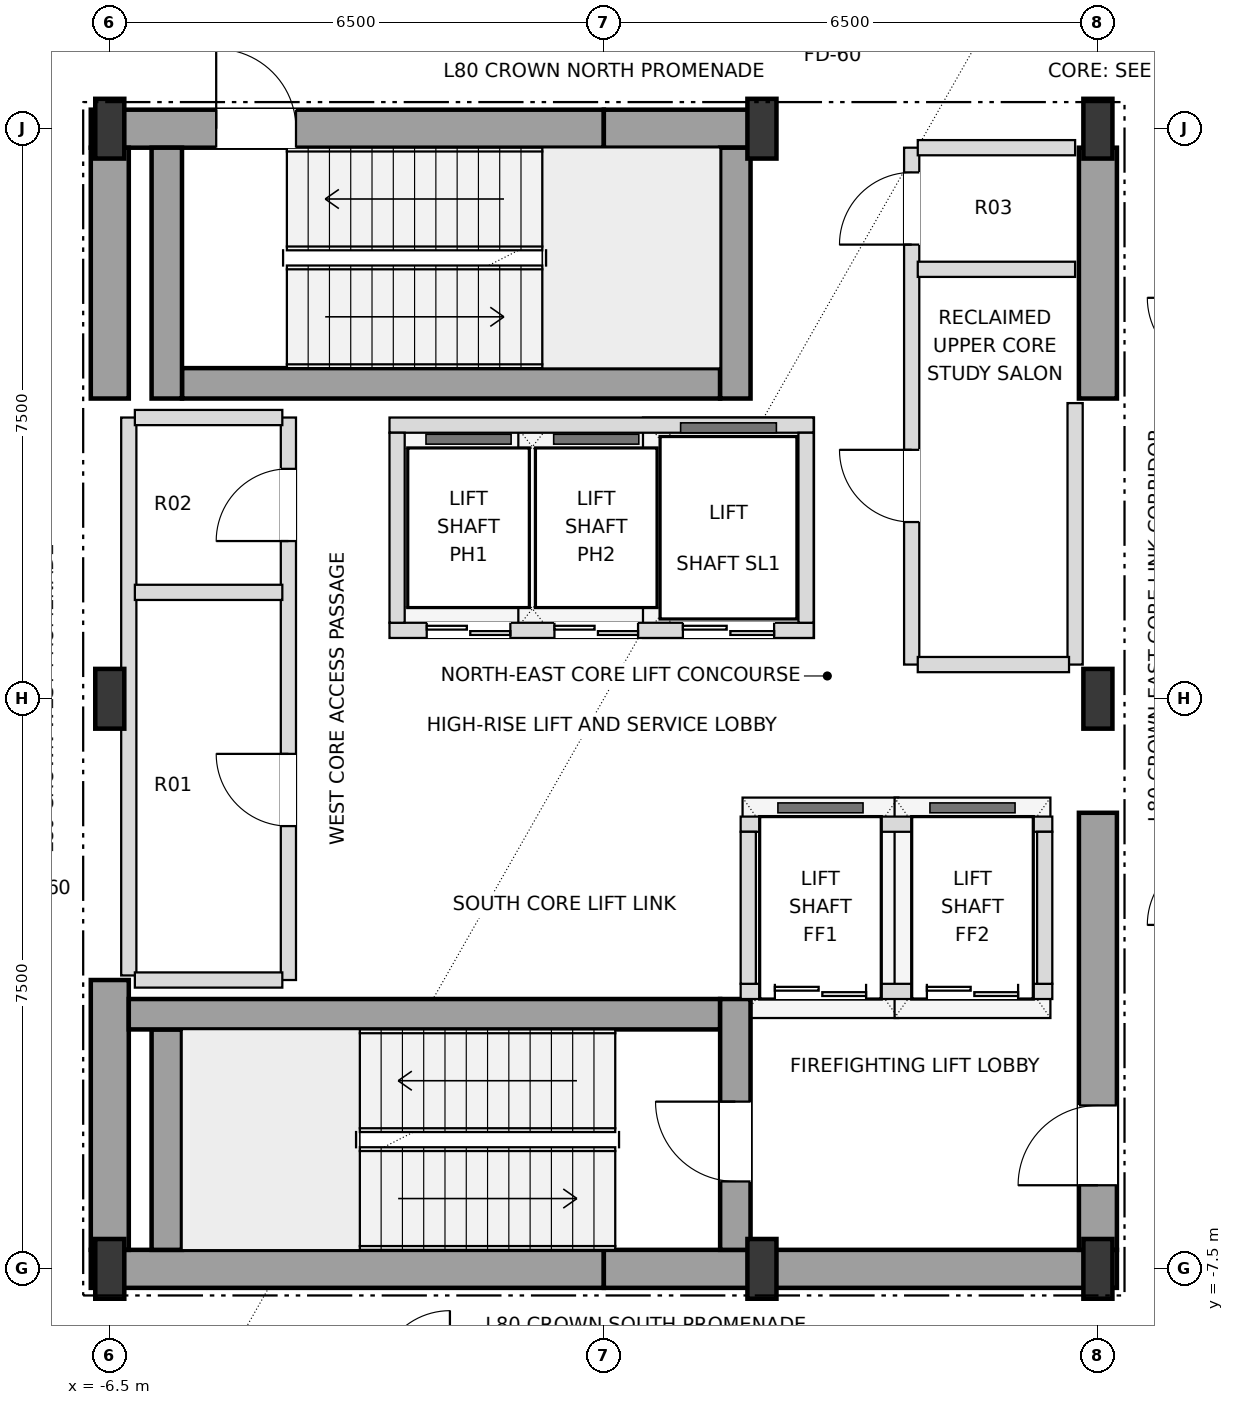
"""IFC4 building model, lengths in metres.
Left out: names, types, materials, properties, quantities, classifications, styles, units other than length and angle.
Written with IfcOpenShell. Run it as: python <this file> out.ifc"""

import sys

from ifc_helpers import new_model, si_unit, direction, frame, frame_2d, origin, origin_2d, place, context, subcontext, project, spatial, rectangle, i_section, extrude, element, fill, save


model = new_model("IFC4")
c1 = context("Model", 3, precision=1e-05, world=origin(), true_north=direction((0.0, 1.0)))
c2 = subcontext(c1, "Body", "Model", "MODEL_VIEW")
j1 = project(units=[si_unit("LENGTHUNIT", "METRE"), si_unit("PLANEANGLEUNIT", "RADIAN")], contexts=[c1])
p1 = place(None, origin())
s1 = spatial("IfcSite", under=j1, at=p1, CompositionType="ELEMENT")
p2 = place(p1, origin())
s2 = spatial("IfcBuilding", under=s1, at=p2, CompositionType="ELEMENT")
p3 = place(p2, frame((0.0, 0.0, 305.1)))
s3 = spatial("IfcBuildingStorey", under=s2, at=p3, CompositionType="ELEMENT", Elevation=305.1)
for number, where, z_axis, x_axis in (
    (1, (-6.5, -7.5, 0.0), (0.0, 0.0, 1.0), (1.0, 0.0, 0.0)),
    (2, (2.08, -7.5, 0.0), (0.0, 0.0, 1.0), (1.0, 0.0, 0.0)),
    (3, (6.5, -7.5, 0.0), (0.0, 0.0, 1.0), (1.0, 0.0, 0.0)),
    (4, (-6.5, 0.0, 0.0), (0.0, 0.0, 1.0), (1.0, 0.0, 0.0)),
    (5, (6.5, 0.0, 0.0), (0.0, 0.0, 1.0), (1.0, 0.0, 0.0)),
    (6, (-6.5, 7.5, 0.0), (0.0, 0.0, 1.0), (1.0, 0.0, 0.0)),
    (7, (2.08, 7.5, 0.0), (0.0, 0.0, 1.0), (1.0, 0.0, 0.0)),
    (8, (6.5, 7.5, 0.0), (0.0, 0.0, 1.0), (1.0, 0.0, 0.0)),
):
    element("IfcColumn", number, at=place(p3, frame(where, z_axis=z_axis, x_axis=x_axis)), inside=s3, PredefinedType="COLUMN", context=c2, shape_type="SweptSolid", body=[
        extrude(i_section(OverallWidth=0.382, OverallDepth=0.786, WebThickness=0.02, FlangeThickness=0.033, at=origin_2d()), origin(), (0.0, 0.0, 1.0), 4.8),
    ])
for number, where, z_axis, x_axis in (
    (9, (-6.75, -7.5, 0.0), (0.0, 0.0, 1.0), (1.0, 0.0, 0.0)),
    (10, (0.0, -7.5, 0.0), (0.0, 0.0, 1.0), (1.0, 0.0, 0.0)),
):
    element("IfcWall", number, at=place(p3, frame(where, z_axis=z_axis, x_axis=x_axis)), inside=s3, PredefinedType="SHEAR", context=c2, shape_type="SweptSolid", body=[
        extrude(rectangle(XDim=6.75, YDim=0.5, at=frame_2d((3.375, 0.0))), origin(), (0.0, 0.0, 1.0), 4.55),
    ])
p4 = place(p3, frame((-6.75, 7.5, 0.0), z_axis=(0.0, 0.0, 1.0), x_axis=(1.0, 0.0, 0.0)))
e11 = element("IfcWall", 11, at=p4, inside=s3, PredefinedType="SHEAR", context=c2, shape_type="SweptSolid", body=[
    extrude(rectangle(XDim=6.75, YDim=0.5, at=frame_2d((3.375, 0.0))), origin(), (0.0, 0.0, 1.0), 4.55),
])
p5 = place(p4, frame((1.65, 0.0, 0.0)))
e12 = element("IfcOpeningElement", 12, at=p5, cuts=e11, PredefinedType="OPENING", context=c2, shape_type="SweptSolid", body=[
    extrude(rectangle(XDim=1.05, YDim=2.15, at=frame_2d((0.525, 1.075))), frame((0.0, 0.26, 0.0), z_axis=(0.0, -1.0, 0.0), x_axis=(1.0, 0.0, 0.0)), (0.0, 0.0, 1.0), 0.52),
])
p6 = place(p3, frame((0.0, 7.5, 0.0), z_axis=(0.0, 0.0, 1.0), x_axis=(1.0, 0.0, 0.0)))
e13 = element("IfcWall", 13, at=p6, inside=s3, PredefinedType="SHEAR", context=c2, shape_type="SweptSolid", body=[
    extrude(rectangle(XDim=2.08, YDim=0.5, at=frame_2d((1.04, 0.0))), origin(), (0.0, 0.0, 1.0), 4.55),
])
p7 = place(p3, frame((-6.5, -7.25, 0.0), z_axis=(0.0, 0.0, 1.0), x_axis=(0.0, 1.0, 0.0)))
e14 = element("IfcWall", 14, at=p7, inside=s3, PredefinedType="SHEAR", context=c2, shape_type="SweptSolid", body=[
    extrude(rectangle(XDim=3.55, YDim=0.5, at=frame_2d((1.775, 0.0))), origin(), (0.0, 0.0, 1.0), 4.55),
])
p8 = place(p3, frame((-6.5, 3.95, 0.0), z_axis=(0.0, 0.0, 1.0), x_axis=(0.0, 1.0, 0.0)))
e15 = element("IfcWall", 15, at=p8, inside=s3, PredefinedType="SHEAR", context=c2, shape_type="SweptSolid", body=[
    extrude(rectangle(XDim=3.3, YDim=0.5, at=frame_2d((1.65, 0.0))), origin(), (0.0, 0.0, 1.0), 4.55),
])
p9 = place(p3, frame((6.5, -7.25, 0.0), z_axis=(0.0, 0.0, 1.0), x_axis=(0.0, 1.0, 0.0)))
e16 = element("IfcWall", 16, at=p9, inside=s3, PredefinedType="SHEAR", context=c2, shape_type="SweptSolid", body=[
    extrude(rectangle(XDim=5.75, YDim=0.5, at=frame_2d((2.875, 0.0))), origin(), (0.0, 0.0, 1.0), 4.55),
])
p10 = place(p9, frame((0.85, 0.0, 0.0)))
e17 = element("IfcOpeningElement", 17, at=p10, cuts=e16, PredefinedType="OPENING", context=c2, shape_type="SweptSolid", body=[
    extrude(rectangle(XDim=1.05, YDim=2.15, at=frame_2d((0.525, 1.075))), frame((0.0, 0.26, 0.0), z_axis=(0.0, -1.0, 0.0), x_axis=(1.0, 0.0, 0.0)), (0.0, 0.0, 1.0), 0.52),
])
p11 = place(p3, frame((6.5, 3.95, 0.0), z_axis=(0.0, 0.0, 1.0), x_axis=(0.0, 1.0, 0.0)))
e18 = element("IfcWall", 18, at=p11, inside=s3, PredefinedType="SHEAR", context=c2, shape_type="SweptSolid", body=[
    extrude(rectangle(XDim=3.3, YDim=0.5, at=frame_2d((1.65, 0.0))), origin(), (0.0, 0.0, 1.0), 4.55),
])
p12 = place(p3, frame((-5.75, -7.25, 0.0), z_axis=(0.0, 0.0, 1.0), x_axis=(0.0, 1.0, 0.0)))
e19 = element("IfcWall", 19, at=p12, inside=s3, PredefinedType="SHEAR", context=c2, shape_type="SweptSolid", body=[
    extrude(rectangle(XDim=2.9, YDim=0.4, at=frame_2d((1.45, 0.0))), origin(), (0.0, 0.0, 1.0), 4.55),
])
p13 = place(p3, frame((-6.25, -4.15, 0.0), z_axis=(0.0, 0.0, 1.0), x_axis=(1.0, 0.0, 0.0)))
e20 = element("IfcWall", 20, at=p13, inside=s3, PredefinedType="SHEAR", context=c2, shape_type="SweptSolid", body=[
    extrude(rectangle(XDim=7.78, YDim=0.4, at=frame_2d((3.89, 0.0))), origin(), (0.0, 0.0, 1.0), 4.55),
])
p14 = place(p3, frame((1.73, -7.25, 0.0), z_axis=(0.0, 0.0, 1.0), x_axis=(0.0, 1.0, 0.0)))
e21 = element("IfcWall", 21, at=p14, inside=s3, PredefinedType="SHEAR", context=c2, shape_type="SweptSolid", body=[
    extrude(rectangle(XDim=3.3, YDim=0.4, at=frame_2d((1.65, 0.0))), origin(), (0.0, 0.0, 1.0), 4.55),
])
p15 = place(p14, frame((0.9, 0.0, 0.0)))
e22 = element("IfcOpeningElement", 22, at=p15, cuts=e21, PredefinedType="OPENING", context=c2, shape_type="SweptSolid", body=[
    extrude(rectangle(XDim=1.05, YDim=2.15, at=frame_2d((0.525, 1.075))), frame((0.0, 0.21, 0.0), z_axis=(0.0, -1.0, 0.0), x_axis=(1.0, 0.0, 0.0)), (0.0, 0.0, 1.0), 0.42),
])
p16 = place(p3, frame((-5.55, 4.15, 0.0), z_axis=(0.0, 0.0, 1.0), x_axis=(1.0, 0.0, 0.0)))
e23 = element("IfcWall", 23, at=p16, inside=s3, PredefinedType="SHEAR", context=c2, shape_type="SweptSolid", body=[
    extrude(rectangle(XDim=7.08, YDim=0.4, at=frame_2d((3.54, 0.0))), origin(), (0.0, 0.0, 1.0), 4.55),
])
for number, where, z_axis, x_axis in (
    (24, (1.73, 3.95, 0.0), (0.0, 0.0, 1.0), (0.0, 1.0, 0.0)),
    (25, (-5.75, 3.95, 0.0), (0.0, 0.0, 1.0), (0.0, 1.0, 0.0)),
):
    element("IfcWall", number, at=place(p3, frame(where, z_axis=z_axis, x_axis=x_axis)), inside=s3, PredefinedType="SHEAR", context=c2, shape_type="SweptSolid", body=[
        extrude(rectangle(XDim=3.3, YDim=0.4, at=frame_2d((1.65, 0.0))), origin(), (0.0, 0.0, 1.0), 4.55),
    ])
p17 = place(p3, frame((-2.82, 0.9, 0.0), z_axis=(0.0, 0.0, 1.0), x_axis=(1.0, 0.0, 0.0)))
e26 = element("IfcWall", 26, at=p17, inside=s3, PredefinedType="SOLIDWALL", context=c2, shape_type="SweptSolid", body=[
    extrude(rectangle(XDim=5.58, YDim=0.2, at=frame_2d((2.79, 0.0))), origin(), (0.0, 0.0, 1.0), 4.55),
])
p18 = place(p17, frame((0.49, 0.0, 0.0)))
e27 = element("IfcOpeningElement", 27, at=p18, cuts=e26, PredefinedType="OPENING", context=c2, shape_type="SweptSolid", body=[
    extrude(rectangle(XDim=1.1, YDim=2.15, at=frame_2d((0.55, 1.075))), frame((0.0, 0.11, 0.0), z_axis=(0.0, -1.0, 0.0), x_axis=(1.0, 0.0, 0.0)), (0.0, 0.0, 1.0), 0.22),
])
p19 = place(p17, frame((2.17, 0.0, 0.0)))
e28 = element("IfcOpeningElement", 28, at=p19, cuts=e26, PredefinedType="OPENING", context=c2, shape_type="SweptSolid", body=[
    extrude(rectangle(XDim=1.1, YDim=2.15, at=frame_2d((0.55, 1.075))), frame((0.0, 0.11, 0.0), z_axis=(0.0, -1.0, 0.0), x_axis=(1.0, 0.0, 0.0)), (0.0, 0.0, 1.0), 0.22),
])
p20 = place(p17, frame((3.86, 0.0, 0.0)))
e29 = element("IfcOpeningElement", 29, at=p20, cuts=e26, PredefinedType="OPENING", context=c2, shape_type="SweptSolid", body=[
    extrude(rectangle(XDim=1.2, YDim=2.2, at=frame_2d((0.6, 1.1))), frame((0.0, 0.11, 0.0), z_axis=(0.0, -1.0, 0.0), x_axis=(1.0, 0.0, 0.0)), (0.0, 0.0, 1.0), 0.22),
])
p21 = place(p3, frame((-2.82, 3.6, 0.0), z_axis=(0.0, 0.0, 1.0), x_axis=(1.0, 0.0, 0.0)))
e30 = element("IfcWall", 30, at=p21, inside=s3, PredefinedType="SOLIDWALL", context=c2, shape_type="SweptSolid", body=[
    extrude(rectangle(XDim=5.58, YDim=0.2, at=frame_2d((2.79, 0.0))), origin(), (0.0, 0.0, 1.0), 4.55),
])
for number, where, z_axis, x_axis in (
    (31, (-2.72, 1.0, 0.0), (0.0, 0.0, 1.0), (0.0, 1.0, 0.0)),
    (32, (2.66, 1.0, 0.0), (0.0, 0.0, 1.0), (0.0, 1.0, 0.0)),
):
    element("IfcWall", number, at=place(p3, frame(where, z_axis=z_axis, x_axis=x_axis)), inside=s3, PredefinedType="SOLIDWALL", context=c2, shape_type="SweptSolid", body=[
        extrude(rectangle(XDim=2.5, YDim=0.2, at=frame_2d((1.25, 0.0))), origin(), (0.0, 0.0, 1.0), 4.55),
    ])
p22 = place(p3, frame((1.8, -3.85, 0.0), z_axis=(0.0, 0.0, 1.0), x_axis=(1.0, 0.0, 0.0)))
e33 = element("IfcWall", 33, at=p22, inside=s3, PredefinedType="SOLIDWALL", context=c2, shape_type="SweptSolid", body=[
    extrude(rectangle(XDim=4.1, YDim=0.2, at=frame_2d((2.05, 0.0))), origin(), (0.0, 0.0, 1.0), 4.55),
])
p23 = place(p22, frame((0.45, 0.0, 0.0)))
e34 = element("IfcOpeningElement", 34, at=p23, cuts=e33, PredefinedType="OPENING", context=c2, shape_type="SweptSolid", body=[
    extrude(rectangle(XDim=1.2, YDim=2.2, at=frame_2d((0.6, 1.1))), frame((0.0, 0.11, 0.0), z_axis=(0.0, -1.0, 0.0), x_axis=(1.0, 0.0, 0.0)), (0.0, 0.0, 1.0), 0.22),
])
p24 = place(p22, frame((2.45, 0.0, 0.0)))
e35 = element("IfcOpeningElement", 35, at=p24, cuts=e33, PredefinedType="OPENING", context=c2, shape_type="SweptSolid", body=[
    extrude(rectangle(XDim=1.2, YDim=2.2, at=frame_2d((0.6, 1.1))), frame((0.0, 0.11, 0.0), z_axis=(0.0, -1.0, 0.0), x_axis=(1.0, 0.0, 0.0)), (0.0, 0.0, 1.0), 0.22),
])
p25 = place(p3, frame((1.8, -1.65, 0.0), z_axis=(0.0, 0.0, 1.0), x_axis=(1.0, 0.0, 0.0)))
e36 = element("IfcWall", 36, at=p25, inside=s3, PredefinedType="SOLIDWALL", context=c2, shape_type="SweptSolid", body=[
    extrude(rectangle(XDim=4.1, YDim=0.2, at=frame_2d((2.05, 0.0))), origin(), (0.0, 0.0, 1.0), 4.55),
])
for number, where, z_axis, x_axis in (
    (37, (1.9, -3.75, 0.0), (0.0, 0.0, 1.0), (0.0, 1.0, 0.0)),
    (38, (5.8, -3.75, 0.0), (0.0, 0.0, 1.0), (0.0, 1.0, 0.0)),
):
    element("IfcWall", number, at=place(p3, frame(where, z_axis=z_axis, x_axis=x_axis)), inside=s3, PredefinedType="SOLIDWALL", context=c2, shape_type="SweptSolid", body=[
        extrude(rectangle(XDim=2.0, YDim=0.2, at=frame_2d((1.0, 0.0))), origin(), (0.0, 0.0, 1.0), 4.55),
    ])
p26 = place(p3, frame((-6.25, -3.64, 0.0), z_axis=(0.0, 0.0, 1.0), x_axis=(0.0, 1.0, 0.0)))
e39 = element("IfcWall", 39, at=p26, inside=s3, PredefinedType="SOLIDWALL", context=c2, shape_type="SweptSolid", body=[
    extrude(rectangle(XDim=7.34, YDim=0.2, at=frame_2d((3.67, 0.0))), origin(), (0.0, 0.0, 1.0), 4.55),
])
p27 = place(p3, frame((-4.15, -3.7, 0.0), z_axis=(0.0, 0.0, 1.0), x_axis=(0.0, 1.0, 0.0)))
e40 = element("IfcWall", 40, at=p27, inside=s3, PredefinedType="SOLIDWALL", context=c2, shape_type="SweptSolid", body=[
    extrude(rectangle(XDim=7.4, YDim=0.2, at=frame_2d((3.7, 0.0))), origin(), (0.0, 0.0, 1.0), 4.55),
])
p28 = place(p27, frame((2.025, 0.0, 0.0)))
e41 = element("IfcOpeningElement", 41, at=p28, cuts=e40, PredefinedType="OPENING", context=c2, shape_type="SweptSolid", body=[
    extrude(rectangle(XDim=0.95, YDim=2.15, at=frame_2d((0.475, 1.075))), frame((0.0, 0.11, 0.0), z_axis=(0.0, -1.0, 0.0), x_axis=(1.0, 0.0, 0.0)), (0.0, 0.0, 1.0), 0.22),
])
p29 = place(p27, frame((5.775, 0.0, 0.0)))
e42 = element("IfcOpeningElement", 42, at=p29, cuts=e40, PredefinedType="OPENING", context=c2, shape_type="SweptSolid", body=[
    extrude(rectangle(XDim=0.95, YDim=2.15, at=frame_2d((0.475, 1.075))), frame((0.0, 0.11, 0.0), z_axis=(0.0, -1.0, 0.0), x_axis=(1.0, 0.0, 0.0)), (0.0, 0.0, 1.0), 0.22),
])
p30 = place(p3, frame((4.05, 0.45, 0.0), z_axis=(0.0, 0.0, 1.0), x_axis=(0.0, 1.0, 0.0)))
e43 = element("IfcWall", 43, at=p30, inside=s3, PredefinedType="SOLIDWALL", context=c2, shape_type="SweptSolid", body=[
    extrude(rectangle(XDim=6.8, YDim=0.2, at=frame_2d((3.4, 0.0))), origin(), (0.0, 0.0, 1.0), 4.55),
])
p31 = place(p30, frame((1.875, 0.0, 0.0)))
e44 = element("IfcOpeningElement", 44, at=p31, cuts=e43, PredefinedType="OPENING", context=c2, shape_type="SweptSolid", body=[
    extrude(rectangle(XDim=0.95, YDim=2.15, at=frame_2d((0.475, 1.075))), frame((0.0, 0.11, 0.0), z_axis=(0.0, -1.0, 0.0), x_axis=(1.0, 0.0, 0.0)), (0.0, 0.0, 1.0), 0.22),
])
p32 = place(p30, frame((5.525, 0.0, 0.0)))
e45 = element("IfcOpeningElement", 45, at=p32, cuts=e43, PredefinedType="OPENING", context=c2, shape_type="SweptSolid", body=[
    extrude(rectangle(XDim=0.95, YDim=2.15, at=frame_2d((0.475, 1.075))), frame((0.0, 0.11, 0.0), z_axis=(0.0, -1.0, 0.0), x_axis=(1.0, 0.0, 0.0)), (0.0, 0.0, 1.0), 0.22),
])
p33 = place(p3, frame((6.2, 0.45, 0.0), z_axis=(0.0, 0.0, 1.0), x_axis=(0.0, 1.0, 0.0)))
e46 = element("IfcWall", 46, at=p33, inside=s3, PredefinedType="SOLIDWALL", context=c2, shape_type="SweptSolid", body=[
    extrude(rectangle(XDim=3.44, YDim=0.2, at=frame_2d((1.72, 0.0))), origin(), (0.0, 0.0, 1.0), 4.55),
])
p34 = place(p3, frame((-6.17, -3.7, 0.0), z_axis=(0.0, 0.0, 1.0), x_axis=(1.0, 0.0, 0.0)))
e47 = element("IfcWall", 47, at=p34, inside=s3, PredefinedType="SOLIDWALL", context=c2, shape_type="SweptSolid", body=[
    extrude(rectangle(XDim=1.94, YDim=0.2, at=frame_2d((0.97, 0.0))), origin(), (0.0, 0.0, 1.0), 4.55),
])
p35 = place(p3, frame((4.13, 0.45, 0.0), z_axis=(0.0, 0.0, 1.0), x_axis=(1.0, 0.0, 0.0)))
e48 = element("IfcWall", 48, at=p35, inside=s3, PredefinedType="SOLIDWALL", context=c2, shape_type="SweptSolid", body=[
    extrude(rectangle(XDim=1.99, YDim=0.2, at=frame_2d((0.995, 0.0))), origin(), (0.0, 0.0, 1.0), 4.55),
])
for number, where, z_axis, x_axis in (
    (49, (-6.17, 1.4, 0.0), (0.0, 0.0, 1.0), (1.0, 0.0, 0.0)),
    (50, (-6.17, 3.7, 0.0), (0.0, 0.0, 1.0), (1.0, 0.0, 0.0)),
):
    element("IfcWall", number, at=place(p3, frame(where, z_axis=z_axis, x_axis=x_axis)), inside=s3, PredefinedType="SOLIDWALL", context=c2, shape_type="SweptSolid", body=[
        extrude(rectangle(XDim=1.94, YDim=0.2, at=frame_2d((0.97, 0.0))), origin(), (0.0, 0.0, 1.0), 4.55),
    ])
for number, where, z_axis, x_axis in (
    (51, (4.13, 5.65, 0.0), (0.0, 0.0, 1.0), (1.0, 0.0, 0.0)),
    (52, (4.13, 7.25, 0.0), (0.0, 0.0, 1.0), (1.0, 0.0, 0.0)),
):
    element("IfcWall", number, at=place(p3, frame(where, z_axis=z_axis, x_axis=x_axis)), inside=s3, PredefinedType="SOLIDWALL", context=c2, shape_type="SweptSolid", body=[
        extrude(rectangle(XDim=2.07, YDim=0.2, at=frame_2d((1.035, 0.0))), origin(), (0.0, 0.0, 1.0), 4.55),
    ])
p36 = place(p10, origin())
e53 = element("IfcDoor", 53, at=p36, inside=s3, OperationType="SINGLE_SWING_LEFT", PredefinedType="DOOR", context=c2, shape_type="SweptSolid", body=[
    extrude(rectangle(XDim=1.05, YDim=2.15, at=frame_2d((0.525, 1.075))), frame((0.0, 0.025, 0.0), z_axis=(0.0, -1.0, 0.0), x_axis=(1.0, 0.0, 0.0)), (0.0, 0.0, 1.0), 0.05),
])
fill(e17, e53)
p37 = place(p15, origin())
e54 = element("IfcDoor", 54, at=p37, inside=s3, OperationType="SINGLE_SWING_RIGHT", PredefinedType="DOOR", context=c2, shape_type="SweptSolid", body=[
    extrude(rectangle(XDim=1.05, YDim=2.15, at=frame_2d((0.525, 1.075))), frame((0.0, 0.025, 0.0), z_axis=(0.0, -1.0, 0.0), x_axis=(1.0, 0.0, 0.0)), (0.0, 0.0, 1.0), 0.05),
])
fill(e22, e54)
p38 = place(p5, origin())
e55 = element("IfcDoor", 55, at=p38, inside=s3, OperationType="SINGLE_SWING_LEFT", PredefinedType="DOOR", context=c2, shape_type="SweptSolid", body=[
    extrude(rectangle(XDim=1.05, YDim=2.15, at=frame_2d((0.525, 1.075))), frame((0.0, 0.025, 0.0), z_axis=(0.0, -1.0, 0.0), x_axis=(1.0, 0.0, 0.0)), (0.0, 0.0, 1.0), 0.05),
])
fill(e12, e55)
p39 = place(p18, origin())
e56 = element("IfcDoor", 56, at=p39, inside=s3, OperationType="DOUBLE_DOOR_SLIDING", PredefinedType="DOOR", context=c2, shape_type="SweptSolid", body=[
    extrude(rectangle(XDim=1.1, YDim=2.15, at=frame_2d((0.55, 1.075))), frame((0.0, 0.025, 0.0), z_axis=(0.0, -1.0, 0.0), x_axis=(1.0, 0.0, 0.0)), (0.0, 0.0, 1.0), 0.05),
])
fill(e27, e56)
p40 = place(p19, origin())
e57 = element("IfcDoor", 57, at=p40, inside=s3, OperationType="DOUBLE_DOOR_SLIDING", PredefinedType="DOOR", context=c2, shape_type="SweptSolid", body=[
    extrude(rectangle(XDim=1.1, YDim=2.15, at=frame_2d((0.55, 1.075))), frame((0.0, 0.025, 0.0), z_axis=(0.0, -1.0, 0.0), x_axis=(1.0, 0.0, 0.0)), (0.0, 0.0, 1.0), 0.05),
])
fill(e28, e57)
p41 = place(p20, origin())
e58 = element("IfcDoor", 58, at=p41, inside=s3, OperationType="DOUBLE_DOOR_SLIDING", PredefinedType="DOOR", context=c2, shape_type="SweptSolid", body=[
    extrude(rectangle(XDim=1.2, YDim=2.2, at=frame_2d((0.6, 1.1))), frame((0.0, 0.025, 0.0), z_axis=(0.0, -1.0, 0.0), x_axis=(1.0, 0.0, 0.0)), (0.0, 0.0, 1.0), 0.05),
])
fill(e29, e58)
p42 = place(p23, origin())
e59 = element("IfcDoor", 59, at=p42, inside=s3, OperationType="DOUBLE_DOOR_SLIDING", PredefinedType="DOOR", context=c2, shape_type="SweptSolid", body=[
    extrude(rectangle(XDim=1.2, YDim=2.2, at=frame_2d((0.6, 1.1))), frame((0.0, 0.025, 0.0), z_axis=(0.0, -1.0, 0.0), x_axis=(1.0, 0.0, 0.0)), (0.0, 0.0, 1.0), 0.05),
])
fill(e34, e59)
p43 = place(p24, origin())
e60 = element("IfcDoor", 60, at=p43, inside=s3, OperationType="DOUBLE_DOOR_SLIDING", PredefinedType="DOOR", context=c2, shape_type="SweptSolid", body=[
    extrude(rectangle(XDim=1.2, YDim=2.2, at=frame_2d((0.6, 1.1))), frame((0.0, 0.025, 0.0), z_axis=(0.0, -1.0, 0.0), x_axis=(1.0, 0.0, 0.0)), (0.0, 0.0, 1.0), 0.05),
])
fill(e35, e60)
p44 = place(p28, origin())
e61 = element("IfcDoor", 61, at=p44, inside=s3, OperationType="SINGLE_SWING_RIGHT", PredefinedType="DOOR", context=c2, shape_type="SweptSolid", body=[
    extrude(rectangle(XDim=0.95, YDim=2.15, at=frame_2d((0.475, 1.075))), frame((0.0, 0.025, 0.0), z_axis=(0.0, -1.0, 0.0), x_axis=(1.0, 0.0, 0.0)), (0.0, 0.0, 1.0), 0.05),
])
fill(e41, e61)
p45 = place(p29, origin())
e62 = element("IfcDoor", 62, at=p45, inside=s3, OperationType="SINGLE_SWING_LEFT", PredefinedType="DOOR", context=c2, shape_type="SweptSolid", body=[
    extrude(rectangle(XDim=0.95, YDim=2.15, at=frame_2d((0.475, 1.075))), frame((0.0, 0.025, 0.0), z_axis=(0.0, -1.0, 0.0), x_axis=(1.0, 0.0, 0.0)), (0.0, 0.0, 1.0), 0.05),
])
fill(e42, e62)
p46 = place(p31, origin())
e63 = element("IfcDoor", 63, at=p46, inside=s3, OperationType="SINGLE_SWING_RIGHT", PredefinedType="DOOR", context=c2, shape_type="SweptSolid", body=[
    extrude(rectangle(XDim=0.95, YDim=2.15, at=frame_2d((0.475, 1.075))), frame((0.0, 0.025, 0.0), z_axis=(0.0, -1.0, 0.0), x_axis=(1.0, 0.0, 0.0)), (0.0, 0.0, 1.0), 0.05),
])
fill(e44, e63)
p47 = place(p32, origin())
e64 = element("IfcDoor", 64, at=p47, inside=s3, OperationType="SINGLE_SWING_LEFT", PredefinedType="DOOR", context=c2, shape_type="SweptSolid", body=[
    extrude(rectangle(XDim=0.95, YDim=2.15, at=frame_2d((0.475, 1.075))), frame((0.0, 0.025, 0.0), z_axis=(0.0, -1.0, 0.0), x_axis=(1.0, 0.0, 0.0)), (0.0, 0.0, 1.0), 0.05),
])
fill(e45, e64)
save(model, sys.argv[1])
